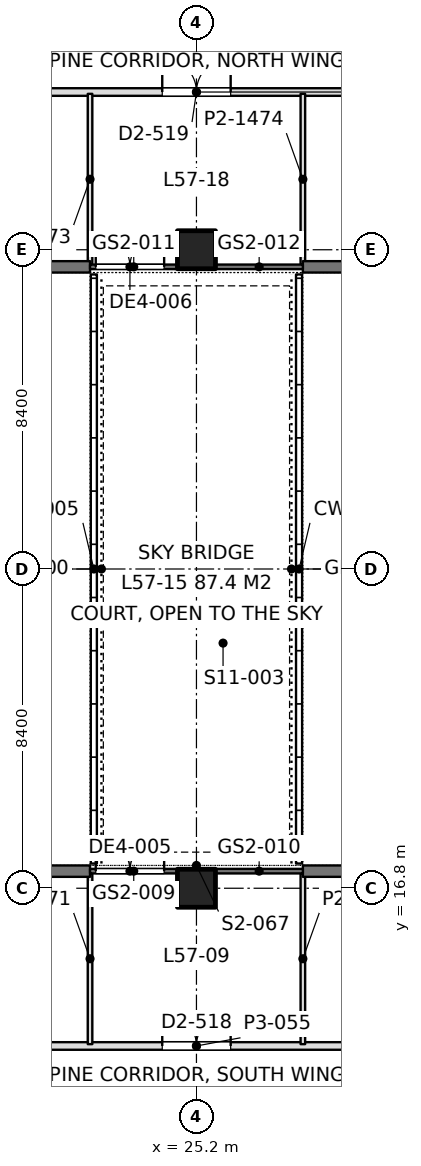
"""IFC4 building model, lengths in metres.
Left out: names, types, materials, properties, quantities, classifications, styles, units other than length and angle.
Written with IfcOpenShell. Run it as: python <this file> out.ifc"""

import sys

from ifc_helpers import new_model, si_unit, direction, frame, frame_2d, origin, origin_2d, place, context, subcontext, project, spatial, rectangle, extrude, element, fill, save


model = new_model("IFC4")
c1 = context("Model", 3, precision=1e-05, world=origin(), true_north=direction((0.0, 1.0)))
c2 = subcontext(c1, "Body", "Model", "MODEL_VIEW")
j1 = project(units=[si_unit("LENGTHUNIT", "METRE"), si_unit("PLANEANGLEUNIT", "RADIAN")], contexts=[c1])
p1 = place(None, origin())
s1 = spatial("IfcSite", under=j1, at=p1, CompositionType="ELEMENT")
p2 = place(p1, origin())
s2 = spatial("IfcBuilding", under=s1, at=p2, CompositionType="ELEMENT")
p3 = place(p2, frame((0.0, 0.0, 250.2)))
s3 = spatial("IfcBuildingStorey", under=s2, at=p3, CompositionType="ELEMENT", Elevation=250.2)
for number, where, z_axis, x_axis in (
    (1, (25.2, 16.8, 0.0), (0.0, 0.0, 1.0), (1.0, 0.0, 0.0)),
    (2, (25.2, 33.6, 0.0), (0.0, 0.0, 1.0), (1.0, 0.0, 0.0)),
):
    element("IfcColumn", number, at=place(p3, frame(where, z_axis=z_axis, x_axis=x_axis)), inside=s3, PredefinedType="COLUMN", context=c2, shape_type="SweptSolid", body=[
        extrude(rectangle(XDim=1.0, YDim=1.0, at=origin_2d()), origin(), (0.0, 0.0, 1.0), 4.5),
    ])
p4 = place(p3, frame((16.65, 17.25, 0.0), z_axis=(0.0, 0.0, 1.0), x_axis=(1.0, 0.0, 0.0)))
e3 = element("IfcWall", 3, at=p4, inside=s3, PredefinedType="SOLIDWALL", context=c2, shape_type="SweptSolid", body=[
    extrude(rectangle(XDim=5.75, YDim=0.3, at=frame_2d((2.875, 0.0))), origin(), (0.0, 0.0, 1.0), 4.35),
])
p5 = place(p4, frame((1.675, 0.0, 0.9)))
e4 = element("IfcOpeningElement", 4, at=p5, cuts=e3, PredefinedType="OPENING", context=c2, shape_type="SweptSolid", body=[
    extrude(rectangle(XDim=2.4, YDim=1.9, at=frame_2d((1.2, 0.95))), frame((0.0, 0.16, 0.0), z_axis=(0.0, -1.0, 0.0), x_axis=(1.0, 0.0, 0.0)), (0.0, 0.0, 1.0), 0.32),
])
p6 = place(p3, frame((22.4, 17.25, 0.0), z_axis=(0.0, 0.0, 1.0), x_axis=(1.0, 0.0, 0.0)))
e5 = element("IfcWall", 5, at=p6, inside=s3, PredefinedType="SOLIDWALL", context=c2, shape_type="SweptSolid", body=[
    extrude(rectangle(XDim=2.3, YDim=0.12, at=frame_2d((1.15, 0.0))), origin(), (0.0, 0.0, 1.0), 4.35),
])
p7 = place(p6, frame((0.15, 0.0, 0.0)))
e6 = element("IfcOpeningElement", 6, at=p7, cuts=e5, PredefinedType="OPENING", context=c2, shape_type="SweptSolid", body=[
    extrude(rectangle(XDim=1.8, YDim=2.4, at=frame_2d((0.9, 1.2))), frame((0.0, 0.07, 0.0), z_axis=(0.0, -1.0, 0.0), x_axis=(1.0, 0.0, 0.0)), (0.0, 0.0, 1.0), 0.14),
])
p8 = place(p3, frame((25.7, 17.25, 0.0), z_axis=(0.0, 0.0, 1.0), x_axis=(1.0, 0.0, 0.0)))
e7 = element("IfcWall", 7, at=p8, inside=s3, PredefinedType="SOLIDWALL", context=c2, shape_type="SweptSolid", body=[
    extrude(rectangle(XDim=2.3, YDim=0.12, at=frame_2d((1.15, 0.0))), origin(), (0.0, 0.0, 1.0), 4.35),
])
p9 = place(p3, frame((28.0, 17.25, 0.0), z_axis=(0.0, 0.0, 1.0), x_axis=(1.0, 0.0, 0.0)))
e8 = element("IfcWall", 8, at=p9, inside=s3, PredefinedType="SOLIDWALL", context=c2, shape_type="SweptSolid", body=[
    extrude(rectangle(XDim=5.75, YDim=0.3, at=frame_2d((2.875, 0.0))), origin(), (0.0, 0.0, 1.0), 4.35),
])
p10 = place(p9, frame((1.675, 0.0, 0.9)))
e9 = element("IfcOpeningElement", 9, at=p10, cuts=e8, PredefinedType="OPENING", context=c2, shape_type="SweptSolid", body=[
    extrude(rectangle(XDim=2.4, YDim=1.9, at=frame_2d((1.2, 0.95))), frame((0.0, 0.16, 0.0), z_axis=(0.0, -1.0, 0.0), x_axis=(1.0, 0.0, 0.0)), (0.0, 0.0, 1.0), 0.32),
])
p11 = place(p3, frame((16.65, 33.15, 0.0), z_axis=(0.0, 0.0, 1.0), x_axis=(1.0, 0.0, 0.0)))
e10 = element("IfcWall", 10, at=p11, inside=s3, PredefinedType="SOLIDWALL", context=c2, shape_type="SweptSolid", body=[
    extrude(rectangle(XDim=5.75, YDim=0.3, at=frame_2d((2.875, 0.0))), origin(), (0.0, 0.0, 1.0), 4.35),
])
p12 = place(p11, frame((1.675, 0.0, 0.9)))
e11 = element("IfcOpeningElement", 11, at=p12, cuts=e10, PredefinedType="OPENING", context=c2, shape_type="SweptSolid", body=[
    extrude(rectangle(XDim=2.4, YDim=1.9, at=frame_2d((1.2, 0.95))), frame((0.0, 0.16, 0.0), z_axis=(0.0, -1.0, 0.0), x_axis=(1.0, 0.0, 0.0)), (0.0, 0.0, 1.0), 0.32),
])
p13 = place(p3, frame((22.4, 33.15, 0.0), z_axis=(0.0, 0.0, 1.0), x_axis=(1.0, 0.0, 0.0)))
e12 = element("IfcWall", 12, at=p13, inside=s3, PredefinedType="SOLIDWALL", context=c2, shape_type="SweptSolid", body=[
    extrude(rectangle(XDim=2.3, YDim=0.12, at=frame_2d((1.15, 0.0))), origin(), (0.0, 0.0, 1.0), 4.35),
])
p14 = place(p13, frame((0.15, 0.0, 0.0)))
e13 = element("IfcOpeningElement", 13, at=p14, cuts=e12, PredefinedType="OPENING", context=c2, shape_type="SweptSolid", body=[
    extrude(rectangle(XDim=1.8, YDim=2.4, at=frame_2d((0.9, 1.2))), frame((0.0, 0.07, 0.0), z_axis=(0.0, -1.0, 0.0), x_axis=(1.0, 0.0, 0.0)), (0.0, 0.0, 1.0), 0.14),
])
p15 = place(p3, frame((25.7, 33.15, 0.0), z_axis=(0.0, 0.0, 1.0), x_axis=(1.0, 0.0, 0.0)))
e14 = element("IfcWall", 14, at=p15, inside=s3, PredefinedType="SOLIDWALL", context=c2, shape_type="SweptSolid", body=[
    extrude(rectangle(XDim=2.3, YDim=0.12, at=frame_2d((1.15, 0.0))), origin(), (0.0, 0.0, 1.0), 4.35),
])
p16 = place(p3, frame((28.0, 33.15, 0.0), z_axis=(0.0, 0.0, 1.0), x_axis=(1.0, 0.0, 0.0)))
e15 = element("IfcWall", 15, at=p16, inside=s3, PredefinedType="SOLIDWALL", context=c2, shape_type="SweptSolid", body=[
    extrude(rectangle(XDim=5.75, YDim=0.3, at=frame_2d((2.875, 0.0))), origin(), (0.0, 0.0, 1.0), 4.35),
])
p17 = place(p16, frame((1.675, 0.0, 0.9)))
e16 = element("IfcOpeningElement", 16, at=p17, cuts=e15, PredefinedType="OPENING", context=c2, shape_type="SweptSolid", body=[
    extrude(rectangle(XDim=2.4, YDim=1.9, at=frame_2d((1.2, 0.95))), frame((0.0, 0.16, 0.0), z_axis=(0.0, -1.0, 0.0), x_axis=(1.0, 0.0, 0.0)), (0.0, 0.0, 1.0), 0.32),
])
p18 = place(p3, frame((16.65, 12.65, 0.0), z_axis=(0.0, 0.0, 1.0), x_axis=(1.0, 0.0, 0.0)))
e17 = element("IfcWall", 17, at=p18, inside=s3, PredefinedType="PARTITIONING", context=c2, shape_type="SweptSolid", body=[
    extrude(rectangle(XDim=17.1, YDim=0.2, at=frame_2d((8.55, 0.0))), origin(), (0.0, 0.0, 1.0), 3.8),
])
p19 = place(p18, frame((2.4, 0.0, 0.0)))
e18 = element("IfcOpeningElement", 18, at=p19, cuts=e17, PredefinedType="OPENING", context=c2, shape_type="SweptSolid", body=[
    extrude(rectangle(XDim=1.1, YDim=2.4, at=frame_2d((0.55, 1.2))), frame((0.0, 0.11, 0.0), z_axis=(0.0, -1.0, 0.0), x_axis=(1.0, 0.0, 0.0)), (0.0, 0.0, 1.0), 0.22),
])
p20 = place(p18, frame((7.65, 0.0, 0.0)))
e19 = element("IfcOpeningElement", 19, at=p20, cuts=e17, PredefinedType="OPENING", context=c2, shape_type="SweptSolid", body=[
    extrude(rectangle(XDim=1.8, YDim=2.2, at=frame_2d((0.9, 1.1))), frame((0.0, 0.11, 0.0), z_axis=(0.0, -1.0, 0.0), x_axis=(1.0, 0.0, 0.0)), (0.0, 0.0, 1.0), 0.22),
])
p21 = place(p18, frame((13.6, 0.0, 0.0)))
e20 = element("IfcOpeningElement", 20, at=p21, cuts=e17, PredefinedType="OPENING", context=c2, shape_type="SweptSolid", body=[
    extrude(rectangle(XDim=1.1, YDim=2.4, at=frame_2d((0.55, 1.2))), frame((0.0, 0.11, 0.0), z_axis=(0.0, -1.0, 0.0), x_axis=(1.0, 0.0, 0.0)), (0.0, 0.0, 1.0), 0.22),
])
for number, where, z_axis, x_axis in (
    (21, (22.4, 12.698, 0.0), (0.0, 0.0, 1.0), (0.0, 1.0, 0.0)),
    (22, (28.0, 12.698, 0.0), (0.0, 0.0, 1.0), (0.0, 1.0, 0.0)),
):
    element("IfcWall", number, at=place(p3, frame(where, z_axis=z_axis, x_axis=x_axis)), inside=s3, PredefinedType="PARTITIONING", context=c2, shape_type="SweptSolid", body=[
        extrude(rectangle(XDim=4.494, YDim=0.12, at=frame_2d((2.247, 0.0))), origin(), (0.0, 0.0, 1.0), 3.5),
    ])
p22 = place(p3, frame((16.65, 37.75, 0.0), z_axis=(0.0, 0.0, 1.0), x_axis=(1.0, 0.0, 0.0)))
e23 = element("IfcWall", 23, at=p22, inside=s3, PredefinedType="PARTITIONING", context=c2, shape_type="SweptSolid", body=[
    extrude(rectangle(XDim=17.1, YDim=0.2, at=frame_2d((8.55, 0.0))), origin(), (0.0, 0.0, 1.0), 3.8),
])
p23 = place(p22, frame((2.4, 0.0, 0.0)))
e24 = element("IfcOpeningElement", 24, at=p23, cuts=e23, PredefinedType="OPENING", context=c2, shape_type="SweptSolid", body=[
    extrude(rectangle(XDim=1.1, YDim=2.4, at=frame_2d((0.55, 1.2))), frame((0.0, 0.11, 0.0), z_axis=(0.0, -1.0, 0.0), x_axis=(1.0, 0.0, 0.0)), (0.0, 0.0, 1.0), 0.22),
])
p24 = place(p22, frame((7.65, 0.0, 0.0)))
e25 = element("IfcOpeningElement", 25, at=p24, cuts=e23, PredefinedType="OPENING", context=c2, shape_type="SweptSolid", body=[
    extrude(rectangle(XDim=1.8, YDim=2.2, at=frame_2d((0.9, 1.1))), frame((0.0, 0.11, 0.0), z_axis=(0.0, -1.0, 0.0), x_axis=(1.0, 0.0, 0.0)), (0.0, 0.0, 1.0), 0.22),
])
p25 = place(p22, frame((13.6, 0.0, 0.0)))
e26 = element("IfcOpeningElement", 26, at=p25, cuts=e23, PredefinedType="OPENING", context=c2, shape_type="SweptSolid", body=[
    extrude(rectangle(XDim=1.1, YDim=2.4, at=frame_2d((0.55, 1.2))), frame((0.0, 0.11, 0.0), z_axis=(0.0, -1.0, 0.0), x_axis=(1.0, 0.0, 0.0)), (0.0, 0.0, 1.0), 0.22),
])
for number, where, z_axis, x_axis in (
    (27, (22.4, 33.208, 0.0), (0.0, 0.0, 1.0), (0.0, 1.0, 0.0)),
    (28, (28.0, 33.208, 0.0), (0.0, 0.0, 1.0), (0.0, 1.0, 0.0)),
):
    element("IfcWall", number, at=place(p3, frame(where, z_axis=z_axis, x_axis=x_axis)), inside=s3, PredefinedType="PARTITIONING", context=c2, shape_type="SweptSolid", body=[
        extrude(rectangle(XDim=4.494, YDim=0.12, at=frame_2d((2.247, 0.0))), origin(), (0.0, 0.0, 1.0), 3.5),
    ])
p26 = place(p7, origin())
e29 = element("IfcDoor", 29, at=p26, inside=s3, OperationType="DOUBLE_DOOR_SINGLE_SWING", PredefinedType="DOOR", context=c2, shape_type="SweptSolid", body=[
    extrude(rectangle(XDim=1.8, YDim=2.4, at=frame_2d((0.9, 1.2))), frame((0.0, 0.025, 0.0), z_axis=(0.0, -1.0, 0.0), x_axis=(1.0, 0.0, 0.0)), (0.0, 0.0, 1.0), 0.05),
])
fill(e6, e29)
p27 = place(p14, origin())
e30 = element("IfcDoor", 30, at=p27, inside=s3, OperationType="DOUBLE_DOOR_SINGLE_SWING", PredefinedType="DOOR", context=c2, shape_type="SweptSolid", body=[
    extrude(rectangle(XDim=1.8, YDim=2.4, at=frame_2d((0.9, 1.2))), frame((0.0, 0.025, 0.0), z_axis=(0.0, -1.0, 0.0), x_axis=(1.0, 0.0, 0.0)), (0.0, 0.0, 1.0), 0.05),
])
fill(e13, e30)
p28 = place(p20, origin())
e31 = element("IfcDoor", 31, at=p28, inside=s3, OperationType="DOUBLE_DOOR_SINGLE_SWING", PredefinedType="DOOR", context=c2, shape_type="SweptSolid", body=[
    extrude(rectangle(XDim=1.8, YDim=2.2, at=frame_2d((0.9, 1.1))), frame((0.0, 0.025, 0.0), z_axis=(0.0, -1.0, 0.0), x_axis=(1.0, 0.0, 0.0)), (0.0, 0.0, 1.0), 0.05),
])
fill(e19, e31)
p29 = place(p24, origin())
e32 = element("IfcDoor", 32, at=p29, inside=s3, OperationType="DOUBLE_DOOR_SINGLE_SWING", PredefinedType="DOOR", context=c2, shape_type="SweptSolid", body=[
    extrude(rectangle(XDim=1.8, YDim=2.2, at=frame_2d((0.9, 1.1))), frame((0.0, 0.025, 0.0), z_axis=(0.0, -1.0, 0.0), x_axis=(1.0, 0.0, 0.0)), (0.0, 0.0, 1.0), 0.05),
])
fill(e25, e32)
save(model, sys.argv[1])
